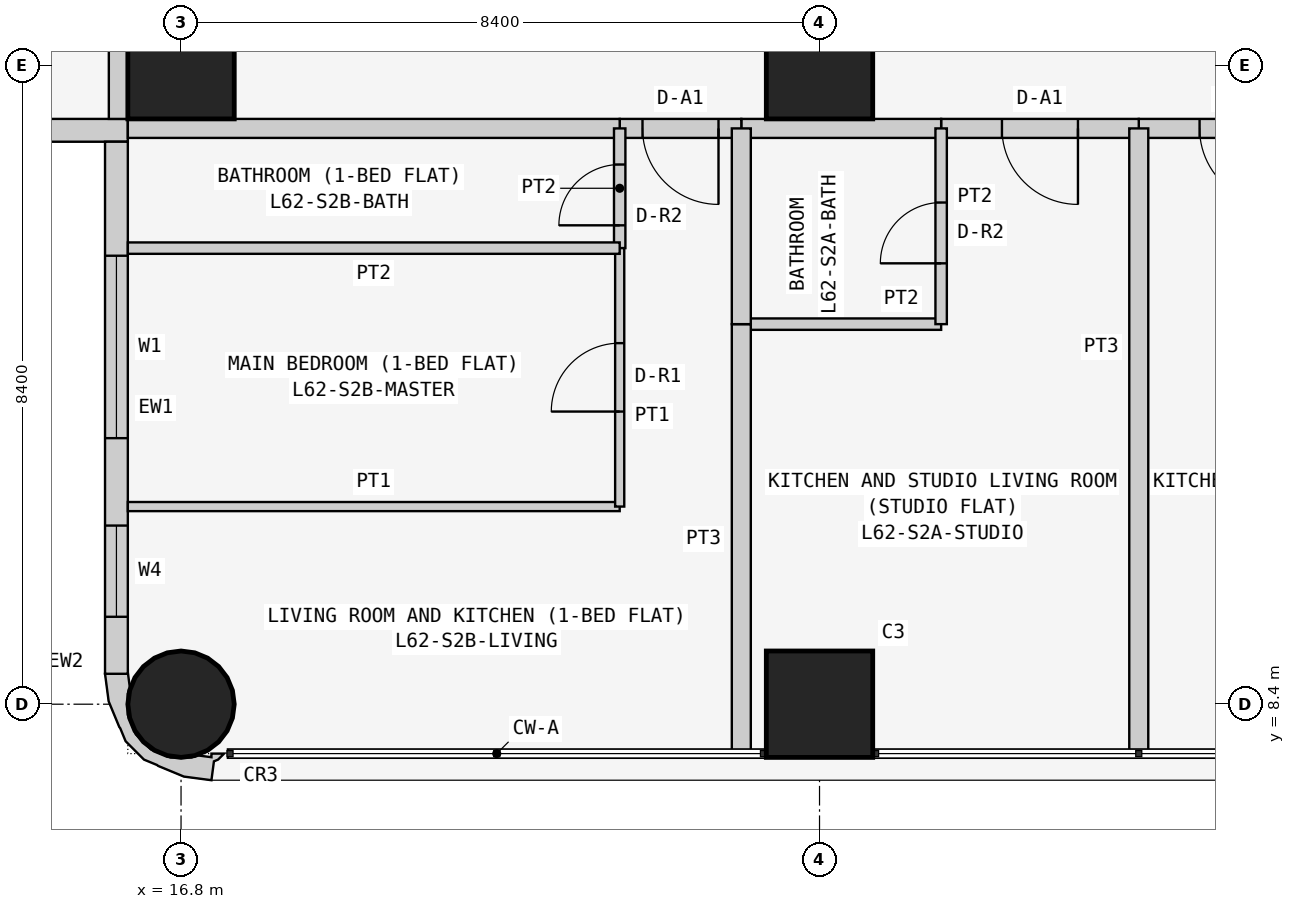
"""IFC4 building model, lengths in metres.
Left out: names, types, materials, properties, quantities, classifications, styles, units other than length and angle.
Written with IfcOpenShell. Run it as: python <this file> out.ifc"""

import sys

from ifc_helpers import new_model, si_unit, direction, frame, frame_2d, origin, origin_2d, place, context, subcontext, project, spatial, polyline, rectangle, circle, outline, extrude, element, fill, save


model = new_model("IFC4")
c1 = context("Model", 3, precision=1e-05, world=origin(), true_north=direction((0.0, 1.0)))
c2 = subcontext(c1, "Body", "Model", "MODEL_VIEW")
j1 = project(units=[si_unit("LENGTHUNIT", "METRE"), si_unit("PLANEANGLEUNIT", "RADIAN")], contexts=[c1])
p1 = place(None, origin())
s1 = spatial("IfcSite", under=j1, at=p1, CompositionType="ELEMENT")
p2 = place(p1, origin())
s2 = spatial("IfcBuilding", under=s1, at=p2, CompositionType="ELEMENT")
p3 = place(p2, frame((0.0, 0.0, 237.3)))
s3 = spatial("IfcBuildingStorey", under=s2, at=p3, CompositionType="ELEMENT", Elevation=237.3)
p4 = place(p3, frame((16.8, 8.4, 0.0), z_axis=(0.0, 0.0, 1.0), x_axis=(1.0, 0.0, 0.0)))
e1 = element("IfcColumn", 1, at=p4, inside=s3, PredefinedType="COLUMN", context=c2, shape_type="SweptSolid", body=[
    extrude(circle(Radius=0.7, at=origin_2d()), origin(), (0.0, 0.0, 1.0), 3.6),
])
for number, where, z_axis, x_axis in (
    (2, (16.8, 16.8, 0.0), (0.0, 0.0, 1.0), (1.0, 0.0, 0.0)),
    (3, (25.2, 8.4, 0.0), (0.0, 0.0, 1.0), (1.0, 0.0, 0.0)),
    (4, (25.2, 16.8, 0.0), (0.0, 0.0, 1.0), (1.0, 0.0, 0.0)),
):
    element("IfcColumn", number, at=place(p3, frame(where, z_axis=z_axis, x_axis=x_axis)), inside=s3, PredefinedType="COLUMN", context=c2, shape_type="SweptSolid", body=[
        extrude(rectangle(XDim=1.4, YDim=1.4, at=origin_2d()), origin(), (0.0, 0.0, 1.0), 3.6),
    ])
p5 = place(p3, frame((0.4, 15.95, 0.0), z_axis=(0.0, 0.0, 1.0), x_axis=(1.0, 0.0, 0.0)))
e5 = element("IfcWall", 5, at=p5, inside=s3, PredefinedType="SOLIDWALL", context=c2, shape_type="SweptSolid", body=[
    extrude(rectangle(XDim=15.7, YDim=0.3, at=frame_2d((7.85, 0.0))), origin(), (0.0, 0.0, 1.0), 3.45),
])
p6 = place(p5, frame((12.4, 0.0, 0.9)))
e6 = element("IfcOpeningElement", 6, at=p6, cuts=e5, PredefinedType="OPENING", context=c2, shape_type="SweptSolid", body=[
    extrude(rectangle(XDim=1.8, YDim=1.5, at=frame_2d((0.9, 0.75))), frame((0.0, 0.16, 0.0), z_axis=(0.0, -1.0, 0.0), x_axis=(1.0, 0.0, 0.0)), (0.0, 0.0, 1.0), 0.32),
])
p7 = place(p5, frame((9.55, 0.0, 1.5)))
e7 = element("IfcOpeningElement", 7, at=p7, cuts=e5, PredefinedType="OPENING", context=c2, shape_type="SweptSolid", body=[
    extrude(rectangle(XDim=0.9, YDim=0.7, at=frame_2d((0.45, 0.35))), frame((0.0, 0.16, 0.0), z_axis=(0.0, -1.0, 0.0), x_axis=(1.0, 0.0, 0.0)), (0.0, 0.0, 1.0), 0.32),
])
p8 = place(p5, frame((5.1, 0.0, 0.9)))
e8 = element("IfcOpeningElement", 8, at=p8, cuts=e5, PredefinedType="OPENING", context=c2, shape_type="SweptSolid", body=[
    extrude(rectangle(XDim=1.8, YDim=1.5, at=frame_2d((0.9, 0.75))), frame((0.0, 0.16, 0.0), z_axis=(0.0, -1.0, 0.0), x_axis=(1.0, 0.0, 0.0)), (0.0, 0.0, 1.0), 0.32),
])
p9 = place(p5, frame((2.0, 0.0, 0.0)))
e9 = element("IfcOpeningElement", 9, at=p9, cuts=e5, PredefinedType="OPENING", context=c2, shape_type="SweptSolid", body=[
    extrude(rectangle(XDim=0.9, YDim=2.4, at=frame_2d((0.45, 1.2))), frame((0.0, 0.16, 0.0), z_axis=(0.0, -1.0, 0.0), x_axis=(1.0, 0.0, 0.0)), (0.0, 0.0, 1.0), 0.32),
])
p10 = place(p5, frame((0.7, 0.0, 0.9)))
e10 = element("IfcOpeningElement", 10, at=p10, cuts=e5, PredefinedType="OPENING", context=c2, shape_type="SweptSolid", body=[
    extrude(rectangle(XDim=1.2, YDim=1.5, at=frame_2d((0.6, 0.75))), frame((0.0, 0.16, 0.0), z_axis=(0.0, -1.0, 0.0), x_axis=(1.0, 0.0, 0.0)), (0.0, 0.0, 1.0), 0.32),
])
p11 = place(p3, frame((15.95, 15.8, 0.0), z_axis=(0.0, 0.0, 1.0), x_axis=(0.0, -1.0, 0.0)))
e11 = element("IfcWall", 11, at=p11, inside=s3, PredefinedType="SOLIDWALL", context=c2, shape_type="SweptSolid", body=[
    extrude(rectangle(XDim=7.0, YDim=0.3, at=frame_2d((3.5, 0.0))), origin(), (0.0, 0.0, 1.0), 3.45),
])
p12 = place(p11, frame((1.5, 0.0, 0.9)))
e12 = element("IfcOpeningElement", 12, at=p12, cuts=e11, PredefinedType="OPENING", context=c2, shape_type="SweptSolid", body=[
    extrude(rectangle(XDim=2.4, YDim=1.5, at=frame_2d((1.2, 0.75))), frame((0.0, 0.16, 0.0), z_axis=(0.0, -1.0, 0.0), x_axis=(1.0, 0.0, 0.0)), (0.0, 0.0, 1.0), 0.32),
])
p13 = place(p11, frame((5.05, 0.0, 0.9)))
e13 = element("IfcOpeningElement", 13, at=p13, cuts=e11, PredefinedType="OPENING", context=c2, shape_type="SweptSolid", body=[
    extrude(rectangle(XDim=1.2, YDim=1.5, at=frame_2d((0.6, 0.75))), frame((0.0, 0.16, 0.0), z_axis=(0.0, -1.0, 0.0), x_axis=(1.0, 0.0, 0.0)), (0.0, 0.0, 1.0), 0.32),
])
p14 = place(p3, frame((16.076, 8.69, 0.0), z_axis=(0.0, 0.0, 1.0), x_axis=(-0.439933741929, -0.898030234854, 0.0)))
e14 = element("IfcWall", 14, at=p14, inside=s3, PredefinedType="SOLIDWALL", context=c2, shape_type="SweptSolid", body=[
    extrude(outline(polyline([(0.664, 1.577), (0.426, 1.497), (0.382, 1.536), (0.276, 1.572), (0.349, 1.423), (0.392, 1.444), (0.453, 1.261), (0.51, 1.211), (0.632, 0.961), (0.65, 0.683), (0.56, 0.419), (0.375, 0.21), (0.125, 0.087), (0.05, 0.082), (-0.127, -0.035), (-0.145, -0.044), (0.022, -0.296), (0.327, -0.094), (0.568, 0.18), (0.578, 0.199), (0.7, 0.337), (0.811, 0.661), (0.799, 0.846), (0.803, 0.866), (0.78, 1.231), (0.664, 1.577)])), origin(), (0.0, 0.0, 1.0), 3.45),
])
p15 = place(p3, frame((32.0, 15.975, 0.0), z_axis=(0.0, 0.0, 1.0), x_axis=(-1.0, 0.0, 0.0)))
e15 = element("IfcWall", 15, at=p15, inside=s3, PredefinedType="PARTITIONING", context=c2, shape_type="SweptSolid", body=[
    extrude(rectangle(XDim=2.6, YDim=0.25, at=frame_2d((1.3, 0.0))), origin(), (0.0, 0.0, 1.0), 3.45),
])
p16 = place(p15, frame((0.8, 0.0, 0.0)))
e16 = element("IfcOpeningElement", 16, at=p16, cuts=e15, PredefinedType="OPENING", context=c2, shape_type="SweptSolid", body=[
    extrude(rectangle(XDim=1.0, YDim=2.1, at=frame_2d((0.5, 1.05))), frame((0.0, 0.135, 0.0), z_axis=(0.0, -1.0, 0.0), x_axis=(1.0, 0.0, 0.0)), (0.0, 0.0, 1.0), 0.27),
])
p17 = place(p3, frame((29.4, 15.975, 0.0), z_axis=(0.0, 0.0, 1.0), x_axis=(-1.0, 0.0, 0.0)))
e17 = element("IfcWall", 17, at=p17, inside=s3, PredefinedType="PARTITIONING", context=c2, shape_type="SweptSolid", body=[
    extrude(rectangle(XDim=2.6, YDim=0.25, at=frame_2d((1.3, 0.0))), origin(), (0.0, 0.0, 1.0), 3.45),
])
p18 = place(p17, frame((0.8, 0.0, 0.0)))
e18 = element("IfcOpeningElement", 18, at=p18, cuts=e17, PredefinedType="OPENING", context=c2, shape_type="SweptSolid", body=[
    extrude(rectangle(XDim=1.0, YDim=2.1, at=frame_2d((0.5, 1.05))), frame((0.0, 0.135, 0.0), z_axis=(0.0, -1.0, 0.0), x_axis=(1.0, 0.0, 0.0)), (0.0, 0.0, 1.0), 0.27),
])
p19 = place(p3, frame((26.8, 15.975, 0.0), z_axis=(0.0, 0.0, 1.0), x_axis=(-1.0, 0.0, 0.0)))
e19 = element("IfcWall", 19, at=p19, inside=s3, PredefinedType="PARTITIONING", context=c2, shape_type="SweptSolid", body=[
    extrude(rectangle(XDim=2.629, YDim=0.25, at=frame_2d((1.314, 0.0))), origin(), (0.0, 0.0, 1.0), 3.45),
])
p20 = place(p3, frame((24.171, 15.975, 0.0), z_axis=(0.0, 0.0, 1.0), x_axis=(-1.0, 0.0, 0.0)))
e20 = element("IfcWall", 20, at=p20, inside=s3, PredefinedType="PARTITIONING", context=c2, shape_type="SweptSolid", body=[
    extrude(rectangle(XDim=1.6, YDim=0.25, at=frame_2d((0.8, 0.0))), origin(), (0.0, 0.0, 1.0), 3.45),
])
p21 = place(p20, frame((0.3, 0.0, 0.0)))
e21 = element("IfcOpeningElement", 21, at=p21, cuts=e20, PredefinedType="OPENING", context=c2, shape_type="SweptSolid", body=[
    extrude(rectangle(XDim=1.0, YDim=2.1, at=frame_2d((0.5, 1.05))), frame((0.0, 0.135, 0.0), z_axis=(0.0, -1.0, 0.0), x_axis=(1.0, 0.0, 0.0)), (0.0, 0.0, 1.0), 0.27),
])
p22 = place(p3, frame((22.571, 15.975, 0.0), z_axis=(0.0, 0.0, 1.0), x_axis=(-1.0, 0.0, 0.0)))
e22 = element("IfcWall", 22, at=p22, inside=s3, PredefinedType="PARTITIONING", context=c2, shape_type="SweptSolid", body=[
    extrude(rectangle(XDim=6.471, YDim=0.25, at=frame_2d((3.235, 0.0))), origin(), (0.0, 0.0, 1.0), 3.45),
])
p23 = place(p3, frame((15.975, 16.1, 0.0), z_axis=(0.0, 0.0, 1.0), x_axis=(0.0, 1.0, 0.0)))
e23 = element("IfcWall", 23, at=p23, inside=s3, PredefinedType="PARTITIONING", context=c2, shape_type="SweptSolid", body=[
    extrude(rectangle(XDim=6.871, YDim=0.25, at=frame_2d((3.436, 0.0))), origin(), (0.0, 0.0, 1.0), 3.45),
])
p24 = place(p3, frame((29.4, 7.75, 0.0), z_axis=(0.0, 0.0, 1.0), x_axis=(0.0, 1.0, 0.0)))
e24 = element("IfcWall", 24, at=p24, inside=s3, PredefinedType="PARTITIONING", context=c2, shape_type="SweptSolid", body=[
    extrude(rectangle(XDim=8.225, YDim=0.25, at=frame_2d((4.113, 0.0))), origin(), (0.0, 0.0, 1.0), 2.848),
])
p25 = place(p3, frame((24.171, 13.4, 0.0), z_axis=(0.0, 0.0, 1.0), x_axis=(1.0, 0.0, 0.0)))
e25 = element("IfcWall", 25, at=p25, inside=s3, PredefinedType="PARTITIONING", context=c2, shape_type="SweptSolid", body=[
    extrude(rectangle(XDim=2.629, YDim=0.15, at=frame_2d((1.314, 0.0))), origin(), (0.0, 0.0, 1.0), 3.45),
])
p26 = place(p3, frame((26.8, 13.4, 0.0), z_axis=(0.0, 0.0, 1.0), x_axis=(0.0, 1.0, 0.0)))
e26 = element("IfcWall", 26, at=p26, inside=s3, PredefinedType="PARTITIONING", context=c2, shape_type="SweptSolid", body=[
    extrude(rectangle(XDim=2.575, YDim=0.15, at=frame_2d((1.288, 0.0))), origin(), (0.0, 0.0, 1.0), 3.45),
])
p27 = place(p26, frame((0.8, 0.0, 0.0)))
e27 = element("IfcOpeningElement", 27, at=p27, cuts=e26, PredefinedType="OPENING", context=c2, shape_type="SweptSolid", body=[
    extrude(rectangle(XDim=0.8, YDim=2.1, at=frame_2d((0.4, 1.05))), frame((0.0, 0.085, 0.0), z_axis=(0.0, -1.0, 0.0), x_axis=(1.0, 0.0, 0.0)), (0.0, 0.0, 1.0), 0.17),
])
p28 = place(p3, frame((24.171, 7.75, 0.0), z_axis=(0.0, 0.0, 1.0), x_axis=(0.0, 1.0, 0.0)))
e28 = element("IfcWall", 28, at=p28, inside=s3, PredefinedType="PARTITIONING", context=c2, shape_type="SweptSolid", body=[
    extrude(rectangle(XDim=5.65, YDim=0.25, at=frame_2d((2.825, 0.0))), origin(), (0.0, 0.0, 1.0), 3.45),
])
p29 = place(p3, frame((24.171, 13.4, 0.0), z_axis=(0.0, 0.0, 1.0), x_axis=(0.0, 1.0, 0.0)))
e29 = element("IfcWall", 29, at=p29, inside=s3, PredefinedType="PARTITIONING", context=c2, shape_type="SweptSolid", body=[
    extrude(rectangle(XDim=2.575, YDim=0.25, at=frame_2d((1.288, 0.0))), origin(), (0.0, 0.0, 1.0), 3.45),
])
p30 = place(p3, frame((22.571, 14.4, 0.0), z_axis=(0.0, 0.0, 1.0), x_axis=(0.0, 1.0, 0.0)))
e30 = element("IfcWall", 30, at=p30, inside=s3, PredefinedType="PARTITIONING", context=c2, shape_type="SweptSolid", body=[
    extrude(rectangle(XDim=1.575, YDim=0.15, at=frame_2d((0.788, 0.0))), origin(), (0.0, 0.0, 1.0), 3.45),
])
p31 = place(p30, frame((0.3, 0.0, 0.0)))
e31 = element("IfcOpeningElement", 31, at=p31, cuts=e30, PredefinedType="OPENING", context=c2, shape_type="SweptSolid", body=[
    extrude(rectangle(XDim=0.8, YDim=2.1, at=frame_2d((0.4, 1.05))), frame((0.0, 0.085, 0.0), z_axis=(0.0, -1.0, 0.0), x_axis=(1.0, 0.0, 0.0)), (0.0, 0.0, 1.0), 0.17),
])
p32 = place(p3, frame((16.1, 11.0, 0.0), z_axis=(0.0, 0.0, 1.0), x_axis=(1.0, 0.0, 0.0)))
e32 = element("IfcWall", 32, at=p32, inside=s3, PredefinedType="PARTITIONING", context=c2, shape_type="SweptSolid", body=[
    extrude(rectangle(XDim=6.471, YDim=0.12, at=frame_2d((3.235, 0.0))), origin(), (0.0, 0.0, 1.0), 3.45),
])
p33 = place(p3, frame((22.571, 11.0, 0.0), z_axis=(0.0, 0.0, 1.0), x_axis=(0.0, 1.0, 0.0)))
e33 = element("IfcWall", 33, at=p33, inside=s3, PredefinedType="PARTITIONING", context=c2, shape_type="SweptSolid", body=[
    extrude(rectangle(XDim=3.4, YDim=0.12, at=frame_2d((1.7, 0.0))), origin(), (0.0, 0.0, 1.0), 3.45),
])
p34 = place(p33, frame((1.25, 0.0, 0.0)))
e34 = element("IfcOpeningElement", 34, at=p34, cuts=e33, PredefinedType="OPENING", context=c2, shape_type="SweptSolid", body=[
    extrude(rectangle(XDim=0.9, YDim=2.1, at=frame_2d((0.45, 1.05))), frame((0.0, 0.07, 0.0), z_axis=(0.0, -1.0, 0.0), x_axis=(1.0, 0.0, 0.0)), (0.0, 0.0, 1.0), 0.14),
])
p35 = place(p3, frame((22.571, 14.4, 0.0), z_axis=(0.0, 0.0, 1.0), x_axis=(-1.0, 0.0, 0.0)))
e35 = element("IfcWall", 35, at=p35, inside=s3, PredefinedType="PARTITIONING", context=c2, shape_type="SweptSolid", body=[
    extrude(rectangle(XDim=6.471, YDim=0.15, at=frame_2d((3.235, 0.0))), origin(), (0.0, 0.0, 1.0), 3.45),
])
p36 = place(p12, origin())
e36 = element("IfcWindow", 36, at=p36, inside=s3, PartitioningType="SINGLE_PANEL", PredefinedType="WINDOW", context=c2, shape_type="SweptSolid", body=[
    extrude(rectangle(XDim=2.4, YDim=1.5, at=frame_2d((1.2, 0.75))), frame((0.0, 0.03, 0.0), z_axis=(0.0, -1.0, 0.0), x_axis=(1.0, 0.0, 0.0)), (0.0, 0.0, 1.0), 0.06),
])
fill(e12, e36)
p37 = place(p13, origin())
e37 = element("IfcWindow", 37, at=p37, inside=s3, PartitioningType="SINGLE_PANEL", PredefinedType="WINDOW", context=c2, shape_type="SweptSolid", body=[
    extrude(rectangle(XDim=1.2, YDim=1.5, at=frame_2d((0.6, 0.75))), frame((0.0, 0.03, 0.0), z_axis=(0.0, -1.0, 0.0), x_axis=(1.0, 0.0, 0.0)), (0.0, 0.0, 1.0), 0.06),
])
fill(e13, e37)
p38 = place(p16, origin())
e38 = element("IfcDoor", 38, at=p38, inside=s3, OperationType="SINGLE_SWING_LEFT", PredefinedType="DOOR", context=c2, shape_type="SweptSolid", body=[
    extrude(rectangle(XDim=1.0, YDim=2.1, at=frame_2d((0.5, 1.05))), frame((0.0, 0.025, 0.0), z_axis=(0.0, -1.0, 0.0), x_axis=(1.0, 0.0, 0.0)), (0.0, 0.0, 1.0), 0.05),
])
fill(e16, e38)
p39 = place(p18, origin())
e39 = element("IfcDoor", 39, at=p39, inside=s3, OperationType="SINGLE_SWING_LEFT", PredefinedType="DOOR", context=c2, shape_type="SweptSolid", body=[
    extrude(rectangle(XDim=1.0, YDim=2.1, at=frame_2d((0.5, 1.05))), frame((0.0, 0.025, 0.0), z_axis=(0.0, -1.0, 0.0), x_axis=(1.0, 0.0, 0.0)), (0.0, 0.0, 1.0), 0.05),
])
fill(e18, e39)
p40 = place(p27, origin())
e40 = element("IfcDoor", 40, at=p40, inside=s3, OperationType="SINGLE_SWING_LEFT", PredefinedType="DOOR", context=c2, shape_type="SweptSolid", body=[
    extrude(rectangle(XDim=0.8, YDim=2.1, at=frame_2d((0.4, 1.05))), frame((0.0, 0.025, 0.0), z_axis=(0.0, -1.0, 0.0), x_axis=(1.0, 0.0, 0.0)), (0.0, 0.0, 1.0), 0.05),
])
fill(e27, e40)
p41 = place(p21, origin())
e41 = element("IfcDoor", 41, at=p41, inside=s3, OperationType="SINGLE_SWING_LEFT", PredefinedType="DOOR", context=c2, shape_type="SweptSolid", body=[
    extrude(rectangle(XDim=1.0, YDim=2.1, at=frame_2d((0.5, 1.05))), frame((0.0, 0.025, 0.0), z_axis=(0.0, -1.0, 0.0), x_axis=(1.0, 0.0, 0.0)), (0.0, 0.0, 1.0), 0.05),
])
fill(e21, e41)
p42 = place(p31, origin())
e42 = element("IfcDoor", 42, at=p42, inside=s3, OperationType="SINGLE_SWING_LEFT", PredefinedType="DOOR", context=c2, shape_type="SweptSolid", body=[
    extrude(rectangle(XDim=0.8, YDim=2.1, at=frame_2d((0.4, 1.05))), frame((0.0, 0.025, 0.0), z_axis=(0.0, -1.0, 0.0), x_axis=(1.0, 0.0, 0.0)), (0.0, 0.0, 1.0), 0.05),
])
fill(e31, e42)
p43 = place(p34, origin())
e43 = element("IfcDoor", 43, at=p43, inside=s3, OperationType="SINGLE_SWING_LEFT", PredefinedType="DOOR", context=c2, shape_type="SweptSolid", body=[
    extrude(rectangle(XDim=0.9, YDim=2.1, at=frame_2d((0.45, 1.05))), frame((0.0, 0.025, 0.0), z_axis=(0.0, -1.0, 0.0), x_axis=(1.0, 0.0, 0.0)), (0.0, 0.0, 1.0), 0.05),
])
fill(e34, e43)
save(model, sys.argv[1])
